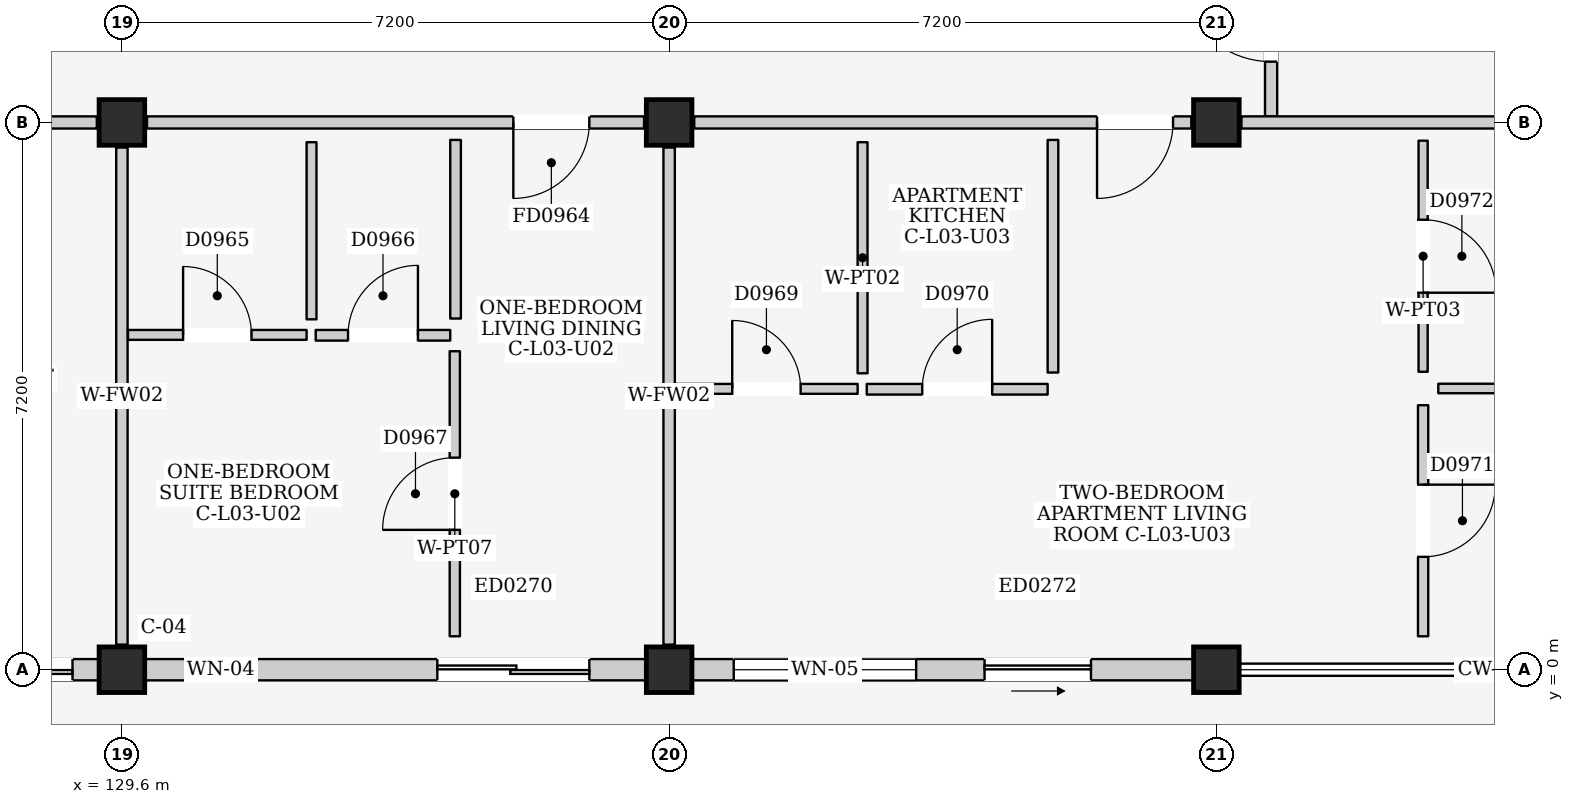
"""IFC4 building model, lengths in metres.
Left out: names, types, materials, properties, quantities, classifications, styles, units other than length and angle.
Written with IfcOpenShell. Run it as: python <this file> out.ifc"""

import sys

from ifc_helpers import new_model, si_unit, direction, frame, frame_2d, origin, origin_2d, place, context, subcontext, project, spatial, rectangle, extrude, element, fill, save


model = new_model("IFC4")
c1 = context("Model", 3, precision=1e-05, world=origin(), true_north=direction((0.0, 1.0)))
c2 = subcontext(c1, "Body", "Model", "MODEL_VIEW")
j1 = project(units=[si_unit("LENGTHUNIT", "METRE"), si_unit("PLANEANGLEUNIT", "RADIAN")], contexts=[c1])
p1 = place(None, origin())
s1 = spatial("IfcSite", under=j1, at=p1, CompositionType="ELEMENT")
p2 = place(p1, origin())
s2 = spatial("IfcBuilding", under=s1, at=p2, CompositionType="ELEMENT")
p3 = place(p2, frame((0.0, 0.0, 12.2)))
s3 = spatial("IfcBuildingStorey", under=s2, at=p3, CompositionType="ELEMENT", Elevation=12.2)
for number, where, z_axis, x_axis in (
    (1, (129.6, 0.0, 0.0), (0.0, 0.0, 1.0), (1.0, 0.0, 0.0)),
    (2, (129.6, 7.2, 0.0), (0.0, 0.0, 1.0), (1.0, 0.0, 0.0)),
    (3, (136.8, 0.0, 0.0), (0.0, 0.0, 1.0), (1.0, 0.0, 0.0)),
    (4, (136.8, 7.2, 0.0), (0.0, 0.0, 1.0), (1.0, 0.0, 0.0)),
    (5, (144.0, 0.0, 0.0), (0.0, 0.0, 1.0), (1.0, 0.0, 0.0)),
    (6, (144.0, 7.2, 0.0), (0.0, 0.0, 1.0), (1.0, 0.0, 0.0)),
):
    element("IfcColumn", number, at=place(p3, frame(where, z_axis=z_axis, x_axis=x_axis)), inside=s3, PredefinedType="COLUMN", context=c2, shape_type="SweptSolid", body=[
        extrude(rectangle(XDim=0.6, YDim=0.6, at=origin_2d()), origin(), (0.0, 0.0, 1.0), 3.2),
    ])
p4 = place(p3, frame((122.7, 0.0, 0.0), z_axis=(0.0, 0.0, 1.0), x_axis=(1.0, 0.0, 0.0)))
e7 = element("IfcWall", 7, at=p4, inside=s3, PredefinedType="ELEMENTEDWALL", context=c2, shape_type="SweptSolid", body=[
    extrude(rectangle(XDim=6.6, YDim=0.28, at=frame_2d((3.3, 0.0))), origin(), (0.0, 0.0, 1.0), 2.445),
])
p5 = place(p4, frame((3.85, 0.0, 0.0)))
e8 = element("IfcOpeningElement", 8, at=p5, cuts=e7, PredefinedType="OPENING", context=c2, shape_type="SweptSolid", body=[
    extrude(rectangle(XDim=2.4, YDim=2.12, at=frame_2d((1.2, 1.06))), frame((0.0, 0.155, 0.0), z_axis=(0.0, -1.0, 0.0), x_axis=(1.0, 0.0, 0.0)), (0.0, 0.0, 1.0), 0.31),
])
p6 = place(p4, frame((0.55, 0.0, 0.9)))
e9 = element("IfcOpeningElement", 9, at=p6, cuts=e7, PredefinedType="OPENING", context=c2, shape_type="SweptSolid", body=[
    extrude(rectangle(XDim=1.2, YDim=1.35, at=frame_2d((0.6, 0.675))), frame((0.0, 0.155, 0.0), z_axis=(0.0, -1.0, 0.0), x_axis=(1.0, 0.0, 0.0)), (0.0, 0.0, 1.0), 0.31),
])
p7 = place(p3, frame((129.9, 0.0, 0.0), z_axis=(0.0, 0.0, 1.0), x_axis=(1.0, 0.0, 0.0)))
e10 = element("IfcWall", 10, at=p7, inside=s3, PredefinedType="ELEMENTEDWALL", context=c2, shape_type="SweptSolid", body=[
    extrude(rectangle(XDim=6.6, YDim=0.28, at=frame_2d((3.3, 0.0))), origin(), (0.0, 0.0, 1.0), 2.445),
])
p8 = place(p7, frame((3.85, 0.0, 0.0)))
e11 = element("IfcOpeningElement", 11, at=p8, cuts=e10, PredefinedType="OPENING", context=c2, shape_type="SweptSolid", body=[
    extrude(rectangle(XDim=2.0, YDim=2.12, at=frame_2d((1.0, 1.06))), frame((0.0, 0.155, 0.0), z_axis=(0.0, -1.0, 0.0), x_axis=(1.0, 0.0, 0.0)), (0.0, 0.0, 1.0), 0.31),
])
p9 = place(p7, frame((0.55, 0.0, 0.9)))
e12 = element("IfcOpeningElement", 12, at=p9, cuts=e10, PredefinedType="OPENING", context=c2, shape_type="SweptSolid", body=[
    extrude(rectangle(XDim=0.9, YDim=1.1, at=frame_2d((0.45, 0.55))), frame((0.0, 0.155, 0.0), z_axis=(0.0, -1.0, 0.0), x_axis=(1.0, 0.0, 0.0)), (0.0, 0.0, 1.0), 0.31),
])
p10 = place(p3, frame((137.1, 0.0, 0.0), z_axis=(0.0, 0.0, 1.0), x_axis=(1.0, 0.0, 0.0)))
e13 = element("IfcWall", 13, at=p10, inside=s3, PredefinedType="ELEMENTEDWALL", context=c2, shape_type="SweptSolid", body=[
    extrude(rectangle(XDim=6.6, YDim=0.28, at=frame_2d((3.3, 0.0))), origin(), (0.0, 0.0, 1.0), 2.445),
])
p11 = place(p10, frame((3.85, 0.0, 0.0)))
e14 = element("IfcOpeningElement", 14, at=p11, cuts=e13, PredefinedType="OPENING", context=c2, shape_type="SweptSolid", body=[
    extrude(rectangle(XDim=1.4, YDim=2.1, at=frame_2d((0.7, 1.05))), frame((0.0, 0.155, 0.0), z_axis=(0.0, -1.0, 0.0), x_axis=(1.0, 0.0, 0.0)), (0.0, 0.0, 1.0), 0.31),
])
p12 = place(p10, frame((0.55, 0.0, 0.685)))
e15 = element("IfcOpeningElement", 15, at=p12, cuts=e13, PredefinedType="OPENING", context=c2, shape_type="SweptSolid", body=[
    extrude(rectangle(XDim=2.4, YDim=1.65, at=frame_2d((1.2, 0.825))), frame((0.0, 0.155, 0.0), z_axis=(0.0, -1.0, 0.0), x_axis=(1.0, 0.0, 0.0)), (0.0, 0.0, 1.0), 0.31),
])
p13 = place(p3, frame((144.72, 7.28, 0.0), z_axis=(0.0, 0.0, 1.0), x_axis=(0.0, 1.0, 0.0)))
e16 = element("IfcWall", 16, at=p13, inside=s3, PredefinedType="PARTITIONING", context=c2, shape_type="SweptSolid", body=[
    extrude(rectangle(XDim=4.32, YDim=0.16, at=frame_2d((2.16, 0.0))), origin(), (0.0, 0.0, 1.0), 2.98),
])
p14 = place(p13, frame((0.72, 0.0, 0.0)))
e17 = element("IfcOpeningElement", 17, at=p14, cuts=e16, PredefinedType="OPENING", context=c2, shape_type="SweptSolid", body=[
    extrude(rectangle(XDim=1.2, YDim=2.2, at=frame_2d((0.6, 1.1))), frame((0.0, 0.095, 0.0), z_axis=(0.0, -1.0, 0.0), x_axis=(1.0, 0.0, 0.0)), (0.0, 0.0, 1.0), 0.19),
])
p15 = place(p3, frame((122.73, 7.2, 0.0), z_axis=(0.0, 0.0, 1.0), x_axis=(1.0, 0.0, 0.0)))
e18 = element("IfcWall", 18, at=p15, inside=s3, PredefinedType="PARTITIONING", context=c2, shape_type="SweptSolid", body=[
    extrude(rectangle(XDim=6.54, YDim=0.16, at=frame_2d((3.27, 0.0))), origin(), (0.0, 0.0, 1.0), 2.365),
])
p16 = place(p15, frame((4.12, 0.0, 0.0)))
e19 = element("IfcOpeningElement", 19, at=p16, cuts=e18, PredefinedType="OPENING", context=c2, shape_type="SweptSolid", body=[
    extrude(rectangle(XDim=1.0, YDim=2.15, at=frame_2d((0.5, 1.075))), frame((0.0, 0.095, 0.0), z_axis=(0.0, -1.0, 0.0), x_axis=(1.0, 0.0, 0.0)), (0.0, 0.0, 1.0), 0.19),
])
p17 = place(p3, frame((129.6, 0.33, 0.0), z_axis=(0.0, 0.0, 1.0), x_axis=(0.0, 1.0, 0.0)))
e20 = element("IfcWall", 20, at=p17, inside=s3, PredefinedType="PARTITIONING", context=c2, shape_type="SweptSolid", body=[
    extrude(rectangle(XDim=6.54, YDim=0.15, at=frame_2d((3.27, 0.0))), origin(), (0.0, 0.0, 1.0), 2.415),
])
p18 = place(p3, frame((129.93, 7.2, 0.0), z_axis=(0.0, 0.0, 1.0), x_axis=(1.0, 0.0, 0.0)))
e21 = element("IfcWall", 21, at=p18, inside=s3, PredefinedType="PARTITIONING", context=c2, shape_type="SweptSolid", body=[
    extrude(rectangle(XDim=6.54, YDim=0.16, at=frame_2d((3.27, 0.0))), origin(), (0.0, 0.0, 1.0), 2.365),
])
p19 = place(p18, frame((4.82, 0.0, 0.0)))
e22 = element("IfcOpeningElement", 22, at=p19, cuts=e21, PredefinedType="OPENING", context=c2, shape_type="SweptSolid", body=[
    extrude(rectangle(XDim=1.0, YDim=2.15, at=frame_2d((0.5, 1.075))), frame((0.0, 0.095, 0.0), z_axis=(0.0, -1.0, 0.0), x_axis=(1.0, 0.0, 0.0)), (0.0, 0.0, 1.0), 0.19),
])
p20 = place(p3, frame((136.8, 0.33, 0.0), z_axis=(0.0, 0.0, 1.0), x_axis=(0.0, 1.0, 0.0)))
e23 = element("IfcWall", 23, at=p20, inside=s3, PredefinedType="PARTITIONING", context=c2, shape_type="SweptSolid", body=[
    extrude(rectangle(XDim=6.54, YDim=0.15, at=frame_2d((3.27, 0.0))), origin(), (0.0, 0.0, 1.0), 2.415),
])
p21 = place(p3, frame((129.68, 4.405, 0.0), z_axis=(0.0, 0.0, 1.0), x_axis=(1.0, 0.0, 0.0)))
e24 = element("IfcWall", 24, at=p21, inside=s3, PredefinedType="PARTITIONING", context=c2, shape_type="SweptSolid", body=[
    extrude(rectangle(XDim=2.35, YDim=0.13, at=frame_2d((1.175, 0.0))), origin(), (0.0, 0.0, 1.0), 2.98),
])
p22 = place(p21, frame((0.725, 0.0, 0.0)))
e25 = element("IfcOpeningElement", 25, at=p22, cuts=e24, PredefinedType="OPENING", context=c2, shape_type="SweptSolid", body=[
    extrude(rectangle(XDim=0.9, YDim=2.1, at=frame_2d((0.45, 1.05))), frame((0.0, 0.08, 0.0), z_axis=(0.0, -1.0, 0.0), x_axis=(1.0, 0.0, 0.0)), (0.0, 0.0, 1.0), 0.16),
])
p23 = place(p3, frame((132.095, 4.61, 0.0), z_axis=(0.0, 0.0, 1.0), x_axis=(0.0, 1.0, 0.0)))
e26 = element("IfcWall", 26, at=p23, inside=s3, PredefinedType="PARTITIONING", context=c2, shape_type="SweptSolid", body=[
    extrude(rectangle(XDim=2.33, YDim=0.13, at=frame_2d((1.165, 0.0))), origin(), (0.0, 0.0, 1.0), 2.98),
])
p24 = place(p3, frame((132.15, 4.4, 0.0), z_axis=(0.0, 0.0, 1.0), x_axis=(1.0, 0.0, 0.0)))
e27 = element("IfcWall", 27, at=p24, inside=s3, PredefinedType="PARTITIONING", context=c2, shape_type="SweptSolid", body=[
    extrude(rectangle(XDim=1.77, YDim=0.14, at=frame_2d((0.885, 0.0))), origin(), (0.0, 0.0, 1.0), 2.98),
])
p25 = place(p24, frame((0.425, 0.0, 0.0)))
e28 = element("IfcOpeningElement", 28, at=p25, cuts=e27, PredefinedType="OPENING", context=c2, shape_type="SweptSolid", body=[
    extrude(rectangle(XDim=0.92, YDim=2.1, at=frame_2d((0.46, 1.05))), frame((0.0, 0.085, 0.0), z_axis=(0.0, -1.0, 0.0), x_axis=(1.0, 0.0, 0.0)), (0.0, 0.0, 1.0), 0.17),
])
p26 = place(p3, frame((133.99, 4.62, 0.0), z_axis=(0.0, 0.0, 1.0), x_axis=(0.0, 1.0, 0.0)))
e29 = element("IfcWall", 29, at=p26, inside=s3, PredefinedType="PARTITIONING", context=c2, shape_type="SweptSolid", body=[
    extrude(rectangle(XDim=2.35, YDim=0.14, at=frame_2d((1.175, 0.0))), origin(), (0.0, 0.0, 1.0), 2.98),
])
p27 = place(p3, frame((133.98, 0.44, 0.0), z_axis=(0.0, 0.0, 1.0), x_axis=(0.0, 1.0, 0.0)))
e30 = element("IfcWall", 30, at=p27, inside=s3, PredefinedType="PARTITIONING", context=c2, shape_type="SweptSolid", body=[
    extrude(rectangle(XDim=3.75, YDim=0.135, at=frame_2d((1.875, 0.0))), origin(), (0.0, 0.0, 1.0), 2.98),
])
p28 = place(p27, frame((1.4, 0.0, 0.0)))
e31 = element("IfcOpeningElement", 31, at=p28, cuts=e30, PredefinedType="OPENING", context=c2, shape_type="SweptSolid", body=[
    extrude(rectangle(XDim=0.95, YDim=2.15, at=frame_2d((0.475, 1.075))), frame((0.0, 0.083, 0.0), z_axis=(0.0, -1.0, 0.0), x_axis=(1.0, 0.0, 0.0)), (0.0, 0.0, 1.0), 0.165),
])
p29 = place(p3, frame((137.13, 7.2, 0.0), z_axis=(0.0, 0.0, 1.0), x_axis=(1.0, 0.0, 0.0)))
e32 = element("IfcWall", 32, at=p29, inside=s3, PredefinedType="PARTITIONING", context=c2, shape_type="SweptSolid", body=[
    extrude(rectangle(XDim=6.54, YDim=0.16, at=frame_2d((3.27, 0.0))), origin(), (0.0, 0.0, 1.0), 2.365),
])
p30 = place(p29, frame((5.3, 0.0, 0.0)))
e33 = element("IfcOpeningElement", 33, at=p30, cuts=e32, PredefinedType="OPENING", context=c2, shape_type="SweptSolid", body=[
    extrude(rectangle(XDim=1.0, YDim=2.15, at=frame_2d((0.5, 1.075))), frame((0.0, 0.095, 0.0), z_axis=(0.0, -1.0, 0.0), x_axis=(1.0, 0.0, 0.0)), (0.0, 0.0, 1.0), 0.19),
])
p31 = place(p3, frame((144.33, 7.2, 0.0), z_axis=(0.0, 0.0, 1.0), x_axis=(1.0, 0.0, 0.0)))
e34 = element("IfcWall", 34, at=p31, inside=s3, PredefinedType="PARTITIONING", context=c2, shape_type="SweptSolid", body=[
    extrude(rectangle(XDim=6.54, YDim=0.16, at=frame_2d((3.27, 0.0))), origin(), (0.0, 0.0, 1.0), 2.365),
])
p32 = place(p3, frame((136.88, 3.695, 0.0), z_axis=(0.0, 0.0, 1.0), x_axis=(1.0, 0.0, 0.0)))
e35 = element("IfcWall", 35, at=p32, inside=s3, PredefinedType="PARTITIONING", context=c2, shape_type="SweptSolid", body=[
    extrude(rectangle(XDim=2.4, YDim=0.13, at=frame_2d((1.2, 0.0))), origin(), (0.0, 0.0, 1.0), 2.98),
])
p33 = place(p32, frame((0.75, 0.0, 0.0)))
e36 = element("IfcOpeningElement", 36, at=p33, cuts=e35, PredefinedType="OPENING", context=c2, shape_type="SweptSolid", body=[
    extrude(rectangle(XDim=0.9, YDim=2.1, at=frame_2d((0.45, 1.05))), frame((0.0, 0.08, 0.0), z_axis=(0.0, -1.0, 0.0), x_axis=(1.0, 0.0, 0.0)), (0.0, 0.0, 1.0), 0.16),
])
p34 = place(p3, frame((139.345, 3.9, 0.0), z_axis=(0.0, 0.0, 1.0), x_axis=(0.0, 1.0, 0.0)))
e37 = element("IfcWall", 37, at=p34, inside=s3, PredefinedType="PARTITIONING", context=c2, shape_type="SweptSolid", body=[
    extrude(rectangle(XDim=3.04, YDim=0.13, at=frame_2d((1.52, 0.0))), origin(), (0.0, 0.0, 1.0), 2.98),
])
p35 = place(p3, frame((139.4, 3.69, 0.0), z_axis=(0.0, 0.0, 1.0), x_axis=(1.0, 0.0, 0.0)))
e38 = element("IfcWall", 38, at=p35, inside=s3, PredefinedType="PARTITIONING", context=c2, shape_type="SweptSolid", body=[
    extrude(rectangle(XDim=2.38, YDim=0.14, at=frame_2d((1.19, 0.0))), origin(), (0.0, 0.0, 1.0), 2.98),
])
p36 = place(p35, frame((0.73, 0.0, 0.0)))
e39 = element("IfcOpeningElement", 39, at=p36, cuts=e38, PredefinedType="OPENING", context=c2, shape_type="SweptSolid", body=[
    extrude(rectangle(XDim=0.92, YDim=2.1, at=frame_2d((0.46, 1.05))), frame((0.0, 0.085, 0.0), z_axis=(0.0, -1.0, 0.0), x_axis=(1.0, 0.0, 0.0)), (0.0, 0.0, 1.0), 0.17),
])
p37 = place(p3, frame((141.85, 3.91, 0.0), z_axis=(0.0, 0.0, 1.0), x_axis=(0.0, 1.0, 0.0)))
e40 = element("IfcWall", 40, at=p37, inside=s3, PredefinedType="PARTITIONING", context=c2, shape_type="SweptSolid", body=[
    extrude(rectangle(XDim=3.06, YDim=0.14, at=frame_2d((1.53, 0.0))), origin(), (0.0, 0.0, 1.0), 2.98),
])
p38 = place(p3, frame((146.72, 0.44, 0.0), z_axis=(0.0, 0.0, 1.0), x_axis=(0.0, 1.0, 0.0)))
e41 = element("IfcWall", 41, at=p38, inside=s3, PredefinedType="PARTITIONING", context=c2, shape_type="SweptSolid", body=[
    extrude(rectangle(XDim=3.04, YDim=0.135, at=frame_2d((1.52, 0.0))), origin(), (0.0, 0.0, 1.0), 2.98),
])
p39 = place(p38, frame((1.045, 0.0, 0.0)))
e42 = element("IfcOpeningElement", 42, at=p39, cuts=e41, PredefinedType="OPENING", context=c2, shape_type="SweptSolid", body=[
    extrude(rectangle(XDim=0.95, YDim=2.15, at=frame_2d((0.475, 1.075))), frame((0.0, 0.083, 0.0), z_axis=(0.0, -1.0, 0.0), x_axis=(1.0, 0.0, 0.0)), (0.0, 0.0, 1.0), 0.165),
])
p40 = place(p3, frame((146.92, 3.7, 0.0), z_axis=(0.0, 0.0, 1.0), x_axis=(1.0, 0.0, 0.0)))
e43 = element("IfcWall", 43, at=p40, inside=s3, PredefinedType="PARTITIONING", context=c2, shape_type="SweptSolid", body=[
    extrude(rectangle(XDim=4.06, YDim=0.125, at=frame_2d((2.03, 0.0))), origin(), (0.0, 0.0, 1.0), 2.98),
])
p41 = place(p3, frame((146.72, 3.92, 0.0), z_axis=(0.0, 0.0, 1.0), x_axis=(0.0, 1.0, 0.0)))
e44 = element("IfcWall", 44, at=p41, inside=s3, PredefinedType="PARTITIONING", context=c2, shape_type="SweptSolid", body=[
    extrude(rectangle(XDim=3.04, YDim=0.12, at=frame_2d((1.52, 0.0))), origin(), (0.0, 0.0, 1.0), 2.98),
])
p42 = place(p41, frame((1.04, 0.0, 0.0)))
e45 = element("IfcOpeningElement", 45, at=p42, cuts=e44, PredefinedType="OPENING", context=c2, shape_type="SweptSolid", body=[
    extrude(rectangle(XDim=0.96, YDim=2.15, at=frame_2d((0.48, 1.075))), frame((0.0, 0.075, 0.0), z_axis=(0.0, -1.0, 0.0), x_axis=(1.0, 0.0, 0.0)), (0.0, 0.0, 1.0), 0.15),
])
p43 = place(p5, frame((2.4, 0.0, 0.0), z_axis=(0.0, 0.0, 1.0), x_axis=(-1.0, 0.0, 0.0)))
e46 = element("IfcDoor", 46, at=p43, inside=s3, OperationType="DOUBLE_DOOR_SLIDING", PredefinedType="DOOR", context=c2, shape_type="SweptSolid", body=[
    extrude(rectangle(XDim=2.4, YDim=2.12, at=frame_2d((1.2, 1.06))), frame((0.0, 0.025, 0.0), z_axis=(0.0, -1.0, 0.0), x_axis=(1.0, 0.0, 0.0)), (0.0, 0.0, 1.0), 0.05),
])
fill(e8, e46)
p44 = place(p8, frame((2.0, 0.0, 0.0), z_axis=(0.0, 0.0, 1.0), x_axis=(-1.0, 0.0, 0.0)))
e47 = element("IfcDoor", 47, at=p44, inside=s3, OperationType="DOUBLE_DOOR_SLIDING", PredefinedType="DOOR", context=c2, shape_type="SweptSolid", body=[
    extrude(rectangle(XDim=2.0, YDim=2.12, at=frame_2d((1.0, 1.06))), frame((0.0, 0.025, 0.0), z_axis=(0.0, -1.0, 0.0), x_axis=(1.0, 0.0, 0.0)), (0.0, 0.0, 1.0), 0.05),
])
fill(e11, e47)
p45 = place(p9, origin())
e48 = element("IfcWindow", 48, at=p45, inside=s3, PartitioningType="SINGLE_PANEL", PredefinedType="WINDOW", context=c2, shape_type="SweptSolid", body=[
    extrude(rectangle(XDim=0.9, YDim=1.1, at=frame_2d((0.45, 0.55))), frame((0.0, 0.03, 0.0), z_axis=(0.0, -1.0, 0.0), x_axis=(1.0, 0.0, 0.0)), (0.0, 0.0, 1.0), 0.06),
])
fill(e12, e48)
p46 = place(p11, frame((1.4, 0.0, 0.0), z_axis=(0.0, 0.0, 1.0), x_axis=(-1.0, 0.0, 0.0)))
e49 = element("IfcDoor", 49, at=p46, inside=s3, OperationType="SLIDING_TO_RIGHT", PredefinedType="DOOR", context=c2, shape_type="SweptSolid", body=[
    extrude(rectangle(XDim=1.4, YDim=2.1, at=frame_2d((0.7, 1.05))), frame((0.0, 0.025, 0.0), z_axis=(0.0, -1.0, 0.0), x_axis=(1.0, 0.0, 0.0)), (0.0, 0.0, 1.0), 0.05),
])
fill(e14, e49)
p47 = place(p12, origin())
e50 = element("IfcWindow", 50, at=p47, inside=s3, PartitioningType="TRIPLE_PANEL_VERTICAL", PredefinedType="WINDOW", context=c2, shape_type="SweptSolid", body=[
    extrude(rectangle(XDim=2.4, YDim=1.65, at=frame_2d((1.2, 0.825))), frame((0.0, 0.03, 0.0), z_axis=(0.0, -1.0, 0.0), x_axis=(1.0, 0.0, 0.0)), (0.0, 0.0, 1.0), 0.06),
])
fill(e15, e50)
p48 = place(p14, origin())
e51 = element("IfcDoor", 51, at=p48, inside=s3, OperationType="SINGLE_SWING_RIGHT", PredefinedType="DOOR", context=c2, shape_type="SweptSolid", body=[
    extrude(rectangle(XDim=1.2, YDim=2.2, at=frame_2d((0.6, 1.1))), frame((0.0, 0.025, 0.0), z_axis=(0.0, -1.0, 0.0), x_axis=(1.0, 0.0, 0.0)), (0.0, 0.0, 1.0), 0.05),
])
fill(e17, e51)
p49 = place(p19, frame((1.0, 0.0, 0.0), z_axis=(0.0, 0.0, 1.0), x_axis=(-1.0, 0.0, 0.0)))
e52 = element("IfcDoor", 52, at=p49, inside=s3, OperationType="SINGLE_SWING_RIGHT", PredefinedType="DOOR", context=c2, shape_type="SweptSolid", body=[
    extrude(rectangle(XDim=1.0, YDim=2.15, at=frame_2d((0.5, 1.075))), frame((0.0, 0.025, 0.0), z_axis=(0.0, -1.0, 0.0), x_axis=(1.0, 0.0, 0.0)), (0.0, 0.0, 1.0), 0.05),
])
fill(e22, e52)
p50 = place(p22, origin())
e53 = element("IfcDoor", 53, at=p50, inside=s3, OperationType="SINGLE_SWING_LEFT", PredefinedType="DOOR", context=c2, shape_type="SweptSolid", body=[
    extrude(rectangle(XDim=0.9, YDim=2.1, at=frame_2d((0.45, 1.05))), frame((0.0, 0.025, 0.0), z_axis=(0.0, -1.0, 0.0), x_axis=(1.0, 0.0, 0.0)), (0.0, 0.0, 1.0), 0.05),
])
fill(e25, e53)
p51 = place(p25, origin())
e54 = element("IfcDoor", 54, at=p51, inside=s3, OperationType="SINGLE_SWING_RIGHT", PredefinedType="DOOR", context=c2, shape_type="SweptSolid", body=[
    extrude(rectangle(XDim=0.92, YDim=2.1, at=frame_2d((0.46, 1.05))), frame((0.0, 0.025, 0.0), z_axis=(0.0, -1.0, 0.0), x_axis=(1.0, 0.0, 0.0)), (0.0, 0.0, 1.0), 0.05),
])
fill(e28, e54)
p52 = place(p28, origin())
e55 = element("IfcDoor", 55, at=p52, inside=s3, OperationType="SINGLE_SWING_LEFT", PredefinedType="DOOR", context=c2, shape_type="SweptSolid", body=[
    extrude(rectangle(XDim=0.95, YDim=2.15, at=frame_2d((0.475, 1.075))), frame((0.0, 0.025, 0.0), z_axis=(0.0, -1.0, 0.0), x_axis=(1.0, 0.0, 0.0)), (0.0, 0.0, 1.0), 0.05),
])
fill(e31, e55)
p53 = place(p30, frame((1.0, 0.0, 0.0), z_axis=(0.0, 0.0, 1.0), x_axis=(-1.0, 0.0, 0.0)))
e56 = element("IfcDoor", 56, at=p53, inside=s3, OperationType="SINGLE_SWING_RIGHT", PredefinedType="DOOR", context=c2, shape_type="SweptSolid", body=[
    extrude(rectangle(XDim=1.0, YDim=2.15, at=frame_2d((0.5, 1.075))), frame((0.0, 0.025, 0.0), z_axis=(0.0, -1.0, 0.0), x_axis=(1.0, 0.0, 0.0)), (0.0, 0.0, 1.0), 0.05),
])
fill(e33, e56)
p54 = place(p33, origin())
e57 = element("IfcDoor", 57, at=p54, inside=s3, OperationType="SINGLE_SWING_LEFT", PredefinedType="DOOR", context=c2, shape_type="SweptSolid", body=[
    extrude(rectangle(XDim=0.9, YDim=2.1, at=frame_2d((0.45, 1.05))), frame((0.0, 0.025, 0.0), z_axis=(0.0, -1.0, 0.0), x_axis=(1.0, 0.0, 0.0)), (0.0, 0.0, 1.0), 0.05),
])
fill(e36, e57)
p55 = place(p36, origin())
e58 = element("IfcDoor", 58, at=p55, inside=s3, OperationType="SINGLE_SWING_RIGHT", PredefinedType="DOOR", context=c2, shape_type="SweptSolid", body=[
    extrude(rectangle(XDim=0.92, YDim=2.1, at=frame_2d((0.46, 1.05))), frame((0.0, 0.025, 0.0), z_axis=(0.0, -1.0, 0.0), x_axis=(1.0, 0.0, 0.0)), (0.0, 0.0, 1.0), 0.05),
])
fill(e39, e58)
p56 = place(p39, frame((0.95, 0.0, 0.0), z_axis=(0.0, 0.0, 1.0), x_axis=(-1.0, 0.0, 0.0)))
e59 = element("IfcDoor", 59, at=p56, inside=s3, OperationType="SINGLE_SWING_LEFT", PredefinedType="DOOR", context=c2, shape_type="SweptSolid", body=[
    extrude(rectangle(XDim=0.95, YDim=2.15, at=frame_2d((0.475, 1.075))), frame((0.0, 0.025, 0.0), z_axis=(0.0, -1.0, 0.0), x_axis=(1.0, 0.0, 0.0)), (0.0, 0.0, 1.0), 0.05),
])
fill(e42, e59)
p57 = place(p42, frame((0.96, 0.0, 0.0), z_axis=(0.0, 0.0, 1.0), x_axis=(-1.0, 0.0, 0.0)))
e60 = element("IfcDoor", 60, at=p57, inside=s3, OperationType="SINGLE_SWING_RIGHT", PredefinedType="DOOR", context=c2, shape_type="SweptSolid", body=[
    extrude(rectangle(XDim=0.96, YDim=2.15, at=frame_2d((0.48, 1.075))), frame((0.0, 0.025, 0.0), z_axis=(0.0, -1.0, 0.0), x_axis=(1.0, 0.0, 0.0)), (0.0, 0.0, 1.0), 0.05),
])
fill(e45, e60)
save(model, sys.argv[1])
